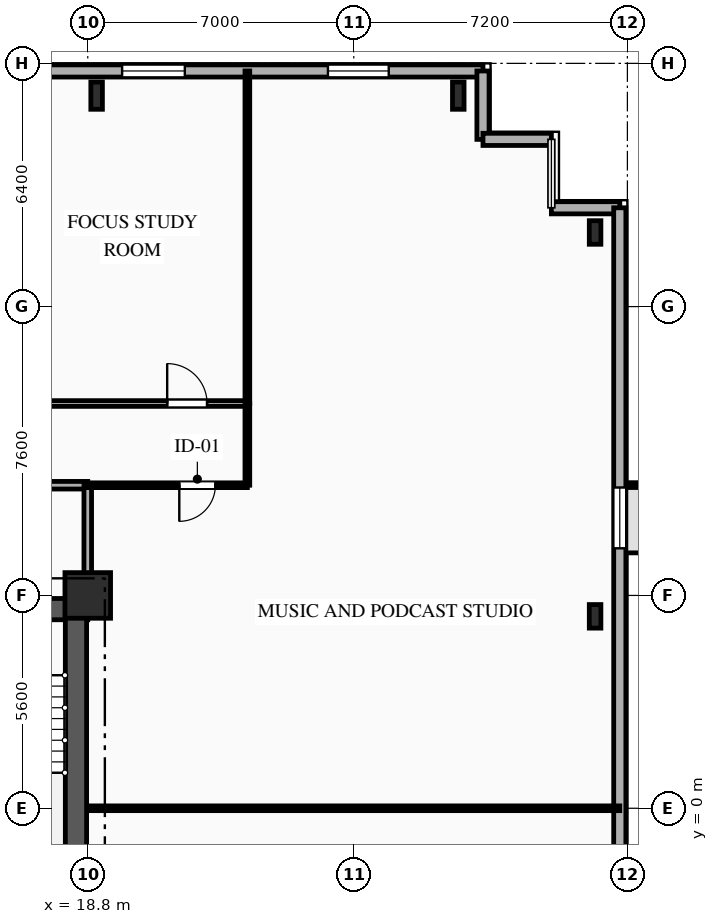
"""IFC4 building model, lengths in metres.
Left out: names, types, materials, properties, quantities, classifications, styles, units other than length and angle.
Written with IfcOpenShell. Run it as: python <this file> out.ifc"""

import sys

from ifc_helpers import new_model, si_unit, direction, frame, frame_2d, origin, origin_2d, place, context, subcontext, project, spatial, rectangle, i_section, extrude, element, fill, save


model = new_model("IFC4")
c1 = context("Model", 3, precision=1e-05, world=origin(), true_north=direction((0.0, 1.0)))
c2 = subcontext(c1, "Body", "Model", "MODEL_VIEW")
j1 = project(units=[si_unit("LENGTHUNIT", "METRE"), si_unit("PLANEANGLEUNIT", "RADIAN")], contexts=[c1])
p1 = place(None, origin())
s1 = spatial("IfcSite", under=j1, at=p1, CompositionType="ELEMENT")
p2 = place(p1, origin())
s2 = spatial("IfcBuilding", under=s1, at=p2, CompositionType="ELEMENT")
p3 = place(p2, frame((0.0, 0.0, 70.55)))
s3 = spatial("IfcBuildingStorey", under=s2, at=p3, CompositionType="ELEMENT", Elevation=70.55)
p4 = place(p3, frame((18.8, 5.6, 0.0), z_axis=(0.0, 0.0, 1.0), x_axis=(1.0, 0.0, 0.0)))
e1 = element("IfcColumn", 1, at=p4, inside=s3, PredefinedType="COLUMN", context=c2, shape_type="SweptSolid", body=[
    extrude(rectangle(XDim=1.2, YDim=1.2, at=origin_2d()), origin(), (0.0, 0.0, 1.0), 3.35),
])
for number, where, z_axis, x_axis in (
    (2, (28.55, 18.75, 0.0), (0.0, 0.0, 1.0), (1.0, 0.0, 0.0)),
    (3, (19.033, 18.75, 0.0), (0.0, 0.0, 1.0), (1.0, 0.0, 0.0)),
):
    element("IfcColumn", number, at=place(p3, frame(where, z_axis=z_axis, x_axis=x_axis)), inside=s3, PredefinedType="COLUMN", context=c2, shape_type="SweptSolid", body=[
        extrude(i_section(OverallWidth=0.304, OverallDepth=0.716, WebThickness=0.021, FlangeThickness=0.04, FilletRadius=0.027, at=origin_2d()), origin(), (0.0, 0.0, 1.0), 3.35),
    ])
for number, where, z_axis, x_axis in (
    (4, (32.15, 5.05, 0.0), (0.0, 0.0, 1.0), (1.0, 0.0, 0.0)),
    (5, (32.15, 15.15, 0.0), (0.0, 0.0, 1.0), (1.0, 0.0, 0.0)),
):
    element("IfcColumn", number, at=place(p3, frame(where, z_axis=z_axis, x_axis=x_axis)), inside=s3, PredefinedType="COLUMN", context=c2, shape_type="SweptSolid", body=[
        extrude(i_section(OverallWidth=0.305, OverallDepth=0.62, WebThickness=0.021, FlangeThickness=0.04, FilletRadius=0.027, at=origin_2d()), origin(), (0.0, 0.0, 1.0), 3.35),
    ])
p5 = place(p3, frame((-29.2, 19.4, 0.0), z_axis=(0.0, 0.0, 1.0), x_axis=(1.0, 0.0, 0.0)))
e6 = element("IfcWall", 6, at=p5, inside=s3, PredefinedType="SOLIDWALL", context=c2, shape_type="SweptSolid", body=[
    extrude(rectangle(XDim=58.4, YDim=0.32, at=frame_2d((29.2, 0.0))), origin(), (0.0, 0.0, 1.0), 3.0),
])
p6 = place(p5, frame((1.255, 0.0, 0.85)))
e7 = element("IfcOpeningElement", 7, at=p6, cuts=e6, PredefinedType="OPENING", context=c2, shape_type="SweptSolid", body=[
    extrude(rectangle(XDim=1.65, YDim=1.85, at=frame_2d((0.825, 0.925))), frame((0.0, 0.17, 0.0), z_axis=(0.0, -1.0, 0.0), x_axis=(1.0, 0.0, 0.0)), (0.0, 0.0, 1.0), 0.34),
])
p7 = place(p5, frame((4.26, 0.0, 0.85)))
e8 = element("IfcOpeningElement", 8, at=p7, cuts=e6, PredefinedType="OPENING", context=c2, shape_type="SweptSolid", body=[
    extrude(rectangle(XDim=1.4, YDim=1.85, at=frame_2d((0.7, 0.925))), frame((0.0, 0.17, 0.0), z_axis=(0.0, -1.0, 0.0), x_axis=(1.0, 0.0, 0.0)), (0.0, 0.0, 1.0), 0.34),
])
p8 = place(p5, frame((8.135, 0.0, 0.85)))
e9 = element("IfcOpeningElement", 9, at=p8, cuts=e6, PredefinedType="OPENING", context=c2, shape_type="SweptSolid", body=[
    extrude(rectangle(XDim=1.65, YDim=1.85, at=frame_2d((0.825, 0.925))), frame((0.0, 0.17, 0.0), z_axis=(0.0, -1.0, 0.0), x_axis=(1.0, 0.0, 0.0)), (0.0, 0.0, 1.0), 0.34),
])
p9 = place(p5, frame((13.575, 0.0, 0.85)))
e10 = element("IfcOpeningElement", 10, at=p9, cuts=e6, PredefinedType="OPENING", context=c2, shape_type="SweptSolid", body=[
    extrude(rectangle(XDim=1.65, YDim=1.85, at=frame_2d((0.825, 0.925))), frame((0.0, 0.17, 0.0), z_axis=(0.0, -1.0, 0.0), x_axis=(1.0, 0.0, 0.0)), (0.0, 0.0, 1.0), 0.34),
])
p10 = place(p5, frame((23.28, 0.0, 0.85)))
e11 = element("IfcOpeningElement", 11, at=p10, cuts=e6, PredefinedType="OPENING", context=c2, shape_type="SweptSolid", body=[
    extrude(rectangle(XDim=1.6, YDim=1.85, at=frame_2d((0.8, 0.925))), frame((0.0, 0.17, 0.0), z_axis=(0.0, -1.0, 0.0), x_axis=(1.0, 0.0, 0.0)), (0.0, 0.0, 1.0), 0.34),
])
p11 = place(p5, frame((33.3, 0.0, 0.85)))
e12 = element("IfcOpeningElement", 12, at=p11, cuts=e6, PredefinedType="OPENING", context=c2, shape_type="SweptSolid", body=[
    extrude(rectangle(XDim=2.2, YDim=1.85, at=frame_2d((1.1, 0.925))), frame((0.0, 0.17, 0.0), z_axis=(0.0, -1.0, 0.0), x_axis=(1.0, 0.0, 0.0)), (0.0, 0.0, 1.0), 0.34),
])
p12 = place(p5, frame((42.335, 0.0, 0.85)))
e13 = element("IfcOpeningElement", 13, at=p12, cuts=e6, PredefinedType="OPENING", context=c2, shape_type="SweptSolid", body=[
    extrude(rectangle(XDim=1.65, YDim=1.85, at=frame_2d((0.825, 0.925))), frame((0.0, 0.17, 0.0), z_axis=(0.0, -1.0, 0.0), x_axis=(1.0, 0.0, 0.0)), (0.0, 0.0, 1.0), 0.34),
])
p13 = place(p5, frame((48.905, 0.0, 0.85)))
e14 = element("IfcOpeningElement", 14, at=p13, cuts=e6, PredefinedType="OPENING", context=c2, shape_type="SweptSolid", body=[
    extrude(rectangle(XDim=1.65, YDim=1.85, at=frame_2d((0.825, 0.925))), frame((0.0, 0.17, 0.0), z_axis=(0.0, -1.0, 0.0), x_axis=(1.0, 0.0, 0.0)), (0.0, 0.0, 1.0), 0.34),
])
p14 = place(p5, frame((54.32, 0.0, 0.85)))
e15 = element("IfcOpeningElement", 15, at=p14, cuts=e6, PredefinedType="OPENING", context=c2, shape_type="SweptSolid", body=[
    extrude(rectangle(XDim=1.6, YDim=1.85, at=frame_2d((0.8, 0.925))), frame((0.0, 0.17, 0.0), z_axis=(0.0, -1.0, 0.0), x_axis=(1.0, 0.0, 0.0)), (0.0, 0.0, 1.0), 0.34),
])
p15 = place(p3, frame((29.2, 19.4, 0.0), z_axis=(0.0, 0.0, 1.0), x_axis=(0.0, -1.0, 0.0)))
e16 = element("IfcWall", 16, at=p15, inside=s3, PredefinedType="SOLIDWALL", context=c2, shape_type="SweptSolid", body=[
    extrude(rectangle(XDim=1.8, YDim=0.32, at=frame_2d((0.9, 0.0))), origin(), (0.0, 0.0, 1.0), 3.0),
])
for number, where, z_axis, x_axis in (
    (17, (29.2, 17.6, 0.0), (0.0, 0.0, 1.0), (1.0, 0.0, 0.0)),
    (18, (31.0, 15.8, 0.0), (0.0, 0.0, 1.0), (1.0, 0.0, 0.0)),
):
    element("IfcWall", number, at=place(p3, frame(where, z_axis=z_axis, x_axis=x_axis)), inside=s3, PredefinedType="SOLIDWALL", context=c2, shape_type="SweptSolid", body=[
        extrude(rectangle(XDim=1.8, YDim=0.32, at=frame_2d((0.9, 0.0))), origin(), (0.0, 0.0, 1.0), 3.0),
    ])
p16 = place(p3, frame((32.8, 15.8, 0.0), z_axis=(0.0, 0.0, 1.0), x_axis=(0.0, -1.0, 0.0)))
e19 = element("IfcWall", 19, at=p16, inside=s3, PredefinedType="SOLIDWALL", context=c2, shape_type="SweptSolid", body=[
    extrude(rectangle(XDim=31.6, YDim=0.32, at=frame_2d((15.8, 0.0))), origin(), (0.0, 0.0, 1.0), 3.0),
])
p17 = place(p16, frame((7.36, 0.0, 0.85)))
e20 = element("IfcOpeningElement", 20, at=p17, cuts=e19, PredefinedType="OPENING", context=c2, shape_type="SweptSolid", body=[
    extrude(rectangle(XDim=1.6, YDim=1.85, at=frame_2d((0.8, 0.925))), frame((0.0, 0.17, 0.0), z_axis=(0.0, -1.0, 0.0), x_axis=(1.0, 0.0, 0.0)), (0.0, 0.0, 1.0), 0.34),
])
p18 = place(p16, frame((22.695, 0.0, 0.85)))
e21 = element("IfcOpeningElement", 21, at=p18, cuts=e19, PredefinedType="OPENING", context=c2, shape_type="SweptSolid", body=[
    extrude(rectangle(XDim=1.65, YDim=1.85, at=frame_2d((0.825, 0.925))), frame((0.0, 0.17, 0.0), z_axis=(0.0, -1.0, 0.0), x_axis=(1.0, 0.0, 0.0)), (0.0, 0.0, 1.0), 0.34),
])
p19 = place(p3, frame((9.2, 5.24, 0.0), z_axis=(0.0, 0.0, 1.0), x_axis=(1.0, 0.0, 0.0)))
e22 = element("IfcWall", 22, at=p19, inside=s3, PredefinedType="SHEAR", context=c2, shape_type="SweptSolid", body=[
    extrude(rectangle(XDim=9.6, YDim=0.56, at=frame_2d((4.8, 0.0))), origin(), (0.0, 0.0, 1.0), 3.0),
])
p20 = place(p19, frame((6.95, 0.0, 0.0)))
e23 = element("IfcOpeningElement", 23, at=p20, cuts=e22, PredefinedType="OPENING", context=c2, shape_type="SweptSolid", body=[
    extrude(rectangle(XDim=1.1, YDim=2.15, at=frame_2d((0.55, 1.075))), frame((0.0, 0.29, 0.0), z_axis=(0.0, -1.0, 0.0), x_axis=(1.0, 0.0, 0.0)), (0.0, 0.0, 1.0), 0.58),
])
p21 = place(p19, frame((3.775, 0.0, 0.0)))
e24 = element("IfcOpeningElement", 24, at=p21, cuts=e22, PredefinedType="OPENING", context=c2, shape_type="SweptSolid", body=[
    extrude(rectangle(XDim=1.05, YDim=2.1, at=frame_2d((0.525, 1.05))), frame((0.0, 0.29, 0.0), z_axis=(0.0, -1.0, 0.0), x_axis=(1.0, 0.0, 0.0)), (0.0, 0.0, 1.0), 0.58),
])
p22 = place(p3, frame((18.49, -5.05, 0.0), z_axis=(0.0, 0.0, 1.0), x_axis=(0.0, 1.0, 0.0)))
e25 = element("IfcWall", 25, at=p22, inside=s3, PredefinedType="SHEAR", context=c2, shape_type="SweptSolid", body=[
    extrude(rectangle(XDim=10.1, YDim=0.56, at=frame_2d((5.05, 0.0))), origin(), (0.0, 0.0, 1.0), 3.0),
])
p23 = place(p3, frame((18.8, 8.5, 0.0), z_axis=(0.0, 0.0, 1.0), x_axis=(-1.0, 0.0, 0.0)))
e26 = element("IfcWall", 26, at=p23, inside=s3, PredefinedType="PARTITIONING", context=c2, shape_type="SweptSolid", body=[
    extrude(rectangle(XDim=6.8, YDim=0.2, at=frame_2d((3.4, 0.0))), origin(), (0.0, 0.0, 1.0), 3.0),
])
p24 = place(p23, frame((3.985, 0.0, 0.0)))
e27 = element("IfcOpeningElement", 27, at=p24, cuts=e26, PredefinedType="OPENING", context=c2, shape_type="SweptSolid", body=[
    extrude(rectangle(XDim=1.1, YDim=2.15, at=frame_2d((0.55, 1.075))), frame((0.0, 0.11, 0.0), z_axis=(0.0, -1.0, 0.0), x_axis=(1.0, 0.0, 0.0)), (0.0, 0.0, 1.0), 0.22),
])
p25 = place(p3, frame((18.8, 5.6, 0.0), z_axis=(0.0, 0.0, 1.0), x_axis=(0.0, 1.0, 0.0)))
e28 = element("IfcWall", 28, at=p25, inside=s3, PredefinedType="PARTITIONING", context=c2, shape_type="SweptSolid", body=[
    extrude(rectangle(XDim=2.9, YDim=0.2, at=frame_2d((1.45, 0.0))), origin(), (0.0, 0.0, 1.0), 2.485),
])
p26 = place(p3, frame((23.0, 8.5, 0.0), z_axis=(0.0, 0.0, 1.0), x_axis=(-1.0, 0.0, 0.0)))
e29 = element("IfcWall", 29, at=p26, inside=s3, PredefinedType="PARTITIONING", context=c2, shape_type="SweptSolid", body=[
    extrude(rectangle(XDim=4.2, YDim=0.125, at=frame_2d((2.1, 0.0))), origin(), (0.0, 0.0, 1.0), 3.0),
])
p27 = place(p26, frame((0.841, 0.0, 0.0)))
e30 = element("IfcOpeningElement", 30, at=p27, cuts=e29, PredefinedType="OPENING", context=c2, shape_type="SweptSolid", body=[
    extrude(rectangle(XDim=0.95, YDim=2.1, at=frame_2d((0.475, 1.05))), frame((0.0, 0.073, 0.0), z_axis=(0.0, -1.0, 0.0), x_axis=(1.0, 0.0, 0.0)), (0.0, 0.0, 1.0), 0.145),
])
p28 = place(p3, frame((23.0, 10.65, 0.0), z_axis=(0.0, 0.0, 1.0), x_axis=(0.0, -1.0, 0.0)))
e31 = element("IfcWall", 31, at=p28, inside=s3, PredefinedType="PARTITIONING", context=c2, shape_type="SweptSolid", body=[
    extrude(rectangle(XDim=2.15, YDim=0.125, at=frame_2d((1.075, 0.0))), origin(), (0.0, 0.0, 1.0), 3.0),
])
p29 = place(p3, frame((16.95, 10.65, 0.0), z_axis=(0.0, 0.0, 1.0), x_axis=(1.0, 0.0, 0.0)))
e32 = element("IfcWall", 32, at=p29, inside=s3, PredefinedType="PARTITIONING", context=c2, shape_type="SweptSolid", body=[
    extrude(rectangle(XDim=6.05, YDim=0.15, at=frame_2d((3.025, 0.0))), origin(), (0.0, 0.0, 1.0), 3.0),
])
p30 = place(p29, frame((3.94, 0.0, 0.0)))
e33 = element("IfcOpeningElement", 33, at=p30, cuts=e32, PredefinedType="OPENING", context=c2, shape_type="SweptSolid", body=[
    extrude(rectangle(XDim=1.05, YDim=2.15, at=frame_2d((0.525, 1.075))), frame((0.0, 0.085, 0.0), z_axis=(0.0, -1.0, 0.0), x_axis=(1.0, 0.0, 0.0)), (0.0, 0.0, 1.0), 0.17),
])
p31 = place(p3, frame((18.8, 0.0, 0.0), z_axis=(0.0, 0.0, 1.0), x_axis=(1.0, 0.0, 0.0)))
e34 = element("IfcWall", 34, at=p31, inside=s3, PredefinedType="PARTITIONING", context=c2, shape_type="SweptSolid", body=[
    extrude(rectangle(XDim=14.0, YDim=0.125, at=frame_2d((7.0, 0.0))), origin(), (0.0, 0.0, 1.0), 3.0),
])
p32 = place(p3, frame((23.0, 10.65, 0.0), z_axis=(0.0, 0.0, 1.0), x_axis=(0.0, 1.0, 0.0)))
e35 = element("IfcWall", 35, at=p32, inside=s3, PredefinedType="PARTITIONING", context=c2, shape_type="SweptSolid", body=[
    extrude(rectangle(XDim=8.75, YDim=0.125, at=frame_2d((4.375, 0.0))), origin(), (0.0, 0.0, 1.0), 3.0),
])
p33 = place(p13, origin())
e36 = element("IfcWindow", 36, at=p33, inside=s3, PartitioningType="SINGLE_PANEL", PredefinedType="WINDOW", context=c2, shape_type="SweptSolid", body=[
    extrude(rectangle(XDim=1.65, YDim=1.85, at=frame_2d((0.825, 0.925))), frame((0.0, 0.03, 0.0), z_axis=(0.0, -1.0, 0.0), x_axis=(1.0, 0.0, 0.0)), (0.0, 0.0, 1.0), 0.06),
])
fill(e14, e36)
p34 = place(p14, origin())
e37 = element("IfcWindow", 37, at=p34, inside=s3, PartitioningType="SINGLE_PANEL", PredefinedType="WINDOW", context=c2, shape_type="SweptSolid", body=[
    extrude(rectangle(XDim=1.6, YDim=1.85, at=frame_2d((0.8, 0.925))), frame((0.0, 0.03, 0.0), z_axis=(0.0, -1.0, 0.0), x_axis=(1.0, 0.0, 0.0)), (0.0, 0.0, 1.0), 0.06),
])
fill(e15, e37)
p35 = place(p17, origin())
e38 = element("IfcWindow", 38, at=p35, inside=s3, PartitioningType="SINGLE_PANEL", PredefinedType="WINDOW", context=c2, shape_type="SweptSolid", body=[
    extrude(rectangle(XDim=1.6, YDim=1.85, at=frame_2d((0.8, 0.925))), frame((0.0, 0.03, 0.0), z_axis=(0.0, -1.0, 0.0), x_axis=(1.0, 0.0, 0.0)), (0.0, 0.0, 1.0), 0.06),
])
fill(e20, e38)
p36 = place(p27, origin())
e39 = element("IfcDoor", 39, at=p36, inside=s3, OperationType="SINGLE_SWING_RIGHT", PredefinedType="DOOR", context=c2, shape_type="SweptSolid", body=[
    extrude(rectangle(XDim=0.95, YDim=2.1, at=frame_2d((0.475, 1.05))), frame((0.0, 0.025, 0.0), z_axis=(0.0, -1.0, 0.0), x_axis=(1.0, 0.0, 0.0)), (0.0, 0.0, 1.0), 0.05),
])
fill(e30, e39)
p37 = place(p30, origin())
e40 = element("IfcDoor", 40, at=p37, inside=s3, OperationType="SINGLE_SWING_LEFT", PredefinedType="DOOR", context=c2, shape_type="SweptSolid", body=[
    extrude(rectangle(XDim=1.05, YDim=2.15, at=frame_2d((0.525, 1.075))), frame((0.0, 0.025, 0.0), z_axis=(0.0, -1.0, 0.0), x_axis=(1.0, 0.0, 0.0)), (0.0, 0.0, 1.0), 0.05),
])
fill(e33, e40)
save(model, sys.argv[1])
